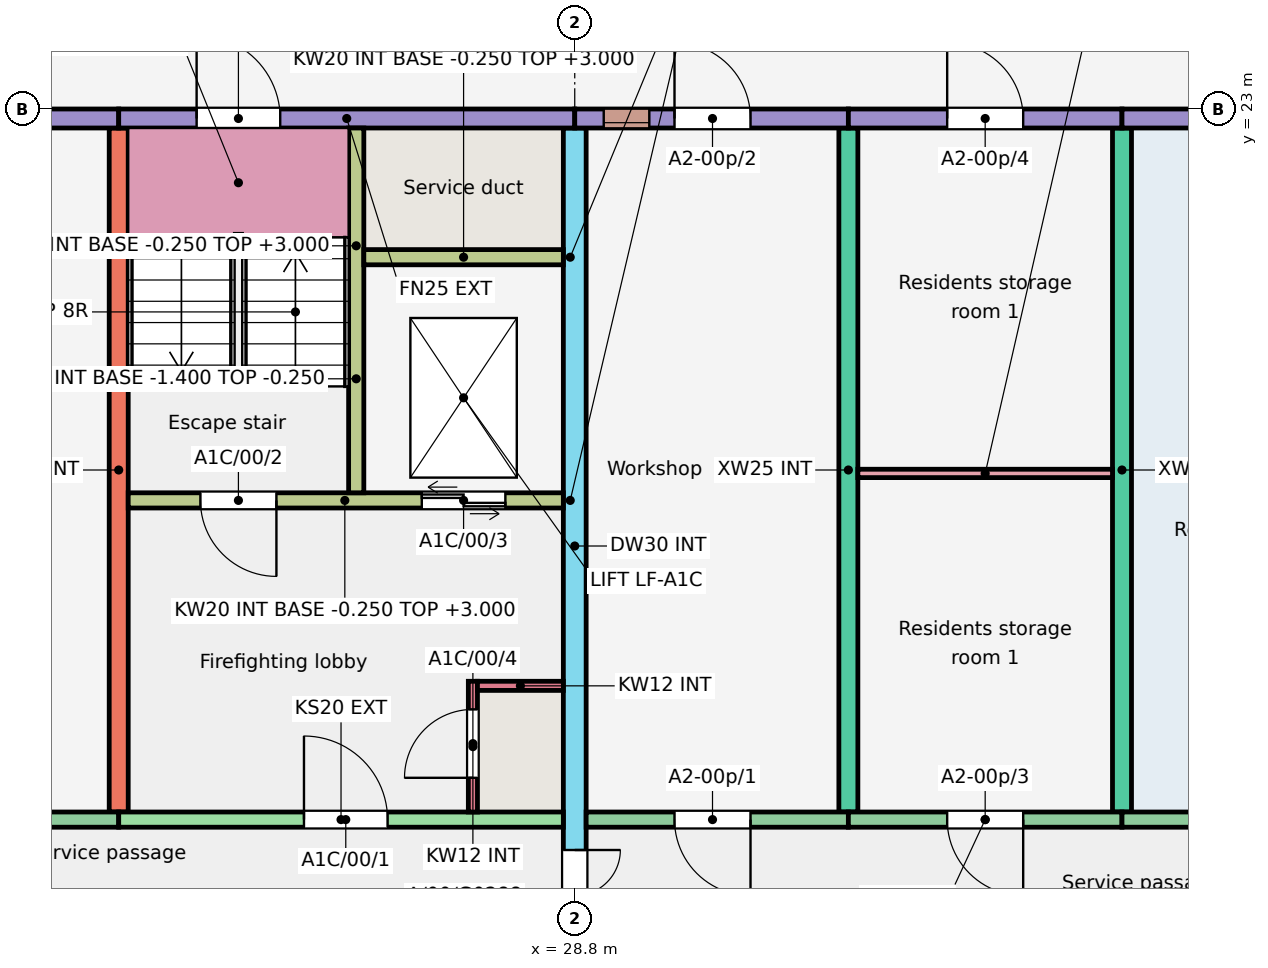
"""IFC4 building model, lengths in metres.
Left out: names, types, materials, properties, quantities, classifications, styles, units other than length and angle.
Written with IfcOpenShell. Run it as: python <this file> out.ifc"""

import sys

from ifc_helpers import new_model, si_unit, direction, frame, frame_2d, origin, place, context, subcontext, project, spatial, rectangle, extrude, element, fill, save


model = new_model("IFC4")
c1 = context("Model", 3, precision=1e-05, world=origin(), true_north=direction((0.0, 1.0)))
c2 = subcontext(c1, "Body", "Model", "MODEL_VIEW")
j1 = project(units=[si_unit("LENGTHUNIT", "METRE"), si_unit("PLANEANGLEUNIT", "RADIAN")], contexts=[c1])
p1 = place(None, origin())
s1 = spatial("IfcSite", under=j1, at=p1, CompositionType="ELEMENT")
p2 = place(p1, origin())
s2 = spatial("IfcBuilding", under=s1, at=p2, CompositionType="ELEMENT")
p3 = place(p2, origin())
s3 = spatial("IfcBuildingStorey", under=s2, at=p3, CompositionType="ELEMENT", Elevation=0.0)
p4 = place(p3, frame((22.8, 13.75, -0.25), z_axis=(0.0, 0.0, 1.0), x_axis=(0.0, 1.0, 0.0)))
e1 = element("IfcWall", 1, at=p4, inside=s3, PredefinedType="SHEAR", context=c2, shape_type="SweptSolid", body=[
    extrude(rectangle(XDim=9.0, YDim=0.25, at=frame_2d((4.5, 0.0))), origin(), (0.0, 0.0, 1.0), 3.25),
])
p5 = place(p3, frame((28.8, 11.75, -0.25), z_axis=(0.0, 0.0, 1.0), x_axis=(0.0, 1.0, 0.0)))
e2 = element("IfcWall", 2, at=p5, inside=s3, PredefinedType="SHEAR", context=c2, shape_type="SweptSolid", body=[
    extrude(rectangle(XDim=11.0, YDim=0.3, at=frame_2d((5.5, 0.0))), origin(), (0.0, 0.0, 1.0), 3.25),
])
p6 = place(p5, frame((0.3, 0.0, 0.25)))
e3 = element("IfcOpeningElement", 3, at=p6, cuts=e2, PredefinedType="OPENING", context=c2, shape_type="SweptSolid", body=[
    extrude(rectangle(XDim=1.2, YDim=2.1, at=frame_2d((0.6, 1.05))), frame((0.0, 0.16, 0.0), z_axis=(0.0, -1.0, 0.0), x_axis=(1.0, 0.0, 0.0)), (0.0, 0.0, 1.0), 0.32),
])
for number, where, z_axis, x_axis in (
    (4, (32.4, 13.75, -0.25), (0.0, 0.0, 1.0), (0.0, 1.0, 0.0)),
    (5, (36.0, 13.75, -0.25), (0.0, 0.0, 1.0), (0.0, 1.0, 0.0)),
):
    element("IfcWall", number, at=place(p3, frame(where, z_axis=z_axis, x_axis=x_axis)), inside=s3, PredefinedType="SHEAR", context=c2, shape_type="SweptSolid", body=[
        extrude(rectangle(XDim=9.0, YDim=0.25, at=frame_2d((4.5, 0.0))), origin(), (0.0, 0.0, 1.0), 3.25),
    ])
p7 = place(p3, frame((19.2, 22.875, -0.25), z_axis=(0.0, 0.0, 1.0), x_axis=(1.0, 0.0, 0.0)))
e6 = element("IfcWall", 6, at=p7, inside=s3, PredefinedType="SOLIDWALL", context=c2, shape_type="SweptSolid", body=[
    extrude(rectangle(XDim=3.6, YDim=0.25, at=frame_2d((1.8, 0.0))), origin(), (0.0, 0.0, 1.0), 3.25),
])
p8 = place(p7, frame((0.363, 0.0, 2.05)))
e7 = element("IfcOpeningElement", 7, at=p8, cuts=e6, PredefinedType="OPENING", context=c2, shape_type="SweptSolid", body=[
    extrude(rectangle(XDim=0.6, YDim=0.6, at=frame_2d((0.3, 0.3))), frame((0.0, 0.135, 0.0), z_axis=(0.0, -1.0, 0.0), x_axis=(1.0, 0.0, 0.0)), (0.0, 0.0, 1.0), 0.27),
])
p9 = place(p7, frame((1.3, 0.0, 0.25)))
e8 = element("IfcOpeningElement", 8, at=p9, cuts=e6, PredefinedType="OPENING", context=c2, shape_type="SweptSolid", body=[
    extrude(rectangle(XDim=1.0, YDim=2.1, at=frame_2d((0.5, 1.05))), frame((0.0, 0.135, 0.0), z_axis=(0.0, -1.0, 0.0), x_axis=(1.0, 0.0, 0.0)), (0.0, 0.0, 1.0), 0.27),
])
p10 = place(p3, frame((19.2, 13.65, -0.25), z_axis=(0.0, 0.0, 1.0), x_axis=(1.0, 0.0, 0.0)))
e9 = element("IfcWall", 9, at=p10, inside=s3, PredefinedType="SOLIDWALL", context=c2, shape_type="SweptSolid", body=[
    extrude(rectangle(XDim=3.6, YDim=0.2, at=frame_2d((1.8, 0.0))), origin(), (0.0, 0.0, 1.0), 3.25),
])
p11 = place(p10, frame((1.3, 0.0, 0.25)))
e10 = element("IfcOpeningElement", 10, at=p11, cuts=e9, PredefinedType="OPENING", context=c2, shape_type="SweptSolid", body=[
    extrude(rectangle(XDim=1.0, YDim=2.1, at=frame_2d((0.5, 1.05))), frame((0.0, 0.11, 0.0), z_axis=(0.0, -1.0, 0.0), x_axis=(1.0, 0.0, 0.0)), (0.0, 0.0, 1.0), 0.22),
])
p12 = place(p3, frame((22.8, 22.875, -0.25), z_axis=(0.0, 0.0, 1.0), x_axis=(1.0, 0.0, 0.0)))
e11 = element("IfcWall", 11, at=p12, inside=s3, PredefinedType="SOLIDWALL", context=c2, shape_type="SweptSolid", body=[
    extrude(rectangle(XDim=6.0, YDim=0.25, at=frame_2d((3.0, 0.0))), origin(), (0.0, 0.0, 1.0), 3.25),
])
p13 = place(p12, frame((1.025, 0.0, 0.25)))
e12 = element("IfcOpeningElement", 12, at=p13, cuts=e11, PredefinedType="OPENING", context=c2, shape_type="SweptSolid", body=[
    extrude(rectangle(XDim=1.1, YDim=2.1, at=frame_2d((0.55, 1.05))), frame((0.0, 0.135, 0.0), z_axis=(0.0, -1.0, 0.0), x_axis=(1.0, 0.0, 0.0)), (0.0, 0.0, 1.0), 0.27),
])
p14 = place(p3, frame((22.8, 13.65, -0.25), z_axis=(0.0, 0.0, 1.0), x_axis=(1.0, 0.0, 0.0)))
e13 = element("IfcWall", 13, at=p14, inside=s3, PredefinedType="SHEAR", context=c2, shape_type="SweptSolid", body=[
    extrude(rectangle(XDim=5.85, YDim=0.2, at=frame_2d((2.925, 0.0))), origin(), (0.0, 0.0, 1.0), 3.25),
])
p15 = place(p14, frame((2.438, 0.0, 0.25)))
e14 = element("IfcOpeningElement", 14, at=p15, cuts=e13, PredefinedType="OPENING", context=c2, shape_type="SweptSolid", body=[
    extrude(rectangle(XDim=1.1, YDim=2.1, at=frame_2d((0.55, 1.05))), frame((0.0, 0.11, 0.0), z_axis=(0.0, -1.0, 0.0), x_axis=(1.0, 0.0, 0.0)), (0.0, 0.0, 1.0), 0.22),
])
p16 = place(p3, frame((22.925, 17.85, -0.25), z_axis=(0.0, 0.0, 1.0), x_axis=(1.0, 0.0, 0.0)))
e15 = element("IfcWall", 15, at=p16, inside=s3, PredefinedType="SHEAR", context=c2, shape_type="SweptSolid", body=[
    extrude(rectangle(XDim=5.725, YDim=0.2, at=frame_2d((2.862, 0.0))), origin(), (0.0, 0.0, 1.0), 3.25),
])
p17 = place(p16, frame((0.95, 0.0, 0.25)))
e16 = element("IfcOpeningElement", 16, at=p17, cuts=e15, PredefinedType="OPENING", context=c2, shape_type="SweptSolid", body=[
    extrude(rectangle(XDim=1.0, YDim=2.1, at=frame_2d((0.5, 1.05))), frame((0.0, 0.11, 0.0), z_axis=(0.0, -1.0, 0.0), x_axis=(1.0, 0.0, 0.0)), (0.0, 0.0, 1.0), 0.22),
])
p18 = place(p16, frame((3.863, 0.0, 0.25)))
e17 = element("IfcOpeningElement", 17, at=p18, cuts=e15, PredefinedType="OPENING", context=c2, shape_type="SweptSolid", body=[
    extrude(rectangle(XDim=1.1, YDim=2.1, at=frame_2d((0.55, 1.05))), frame((0.0, 0.11, 0.0), z_axis=(0.0, -1.0, 0.0), x_axis=(1.0, 0.0, 0.0)), (0.0, 0.0, 1.0), 0.22),
])
p19 = place(p3, frame((25.925, 17.95, -0.25), z_axis=(0.0, 0.0, 1.0), x_axis=(0.0, 1.0, 0.0)))
e18 = element("IfcWall", 18, at=p19, inside=s3, PredefinedType="SHEAR", context=c2, shape_type="SweptSolid", body=[
    extrude(rectangle(XDim=4.8, YDim=0.2, at=frame_2d((2.4, 0.0))), origin(), (0.0, 0.0, 1.0), 3.25),
])
p20 = place(p3, frame((26.025, 21.05, -0.25), z_axis=(0.0, 0.0, 1.0), x_axis=(1.0, 0.0, 0.0)))
e19 = element("IfcWall", 19, at=p20, inside=s3, PredefinedType="SHEAR", context=c2, shape_type="SweptSolid", body=[
    extrude(rectangle(XDim=2.625, YDim=0.2, at=frame_2d((1.312, 0.0))), origin(), (0.0, 0.0, 1.0), 3.25),
])
p21 = place(p3, frame((27.46, 13.75, -0.25), z_axis=(0.0, 0.0, 1.0), x_axis=(0.0, 1.0, 0.0)))
e20 = element("IfcWall", 20, at=p21, inside=s3, PredefinedType="SHEAR", context=c2, shape_type="SweptSolid", body=[
    extrude(rectangle(XDim=1.72, YDim=0.12, at=frame_2d((0.86, 0.0))), origin(), (0.0, 0.0, 1.0), 3.25),
])
p22 = place(p21, frame((0.45, 0.0, 0.25)))
e21 = element("IfcOpeningElement", 21, at=p22, cuts=e20, PredefinedType="OPENING", context=c2, shape_type="SweptSolid", body=[
    extrude(rectangle(XDim=0.9, YDim=2.1, at=frame_2d((0.45, 1.05))), frame((0.0, 0.07, 0.0), z_axis=(0.0, -1.0, 0.0), x_axis=(1.0, 0.0, 0.0)), (0.0, 0.0, 1.0), 0.14),
])
p23 = place(p3, frame((27.52, 15.41, -0.25), z_axis=(0.0, 0.0, 1.0), x_axis=(1.0, 0.0, 0.0)))
e22 = element("IfcWall", 22, at=p23, inside=s3, PredefinedType="SHEAR", context=c2, shape_type="SweptSolid", body=[
    extrude(rectangle(XDim=1.13, YDim=0.12, at=frame_2d((0.565, 0.0))), origin(), (0.0, 0.0, 1.0), 3.25),
])
p24 = place(p3, frame((28.8, 22.875, -0.25), z_axis=(0.0, 0.0, 1.0), x_axis=(1.0, 0.0, 0.0)))
e23 = element("IfcWall", 23, at=p24, inside=s3, PredefinedType="SOLIDWALL", context=c2, shape_type="SweptSolid", body=[
    extrude(rectangle(XDim=3.6, YDim=0.25, at=frame_2d((1.8, 0.0))), origin(), (0.0, 0.0, 1.0), 3.25),
])
p25 = place(p24, frame((0.381, 0.0, 2.05)))
e24 = element("IfcOpeningElement", 24, at=p25, cuts=e23, PredefinedType="OPENING", context=c2, shape_type="SweptSolid", body=[
    extrude(rectangle(XDim=0.6, YDim=0.6, at=frame_2d((0.3, 0.3))), frame((0.0, 0.135, 0.0), z_axis=(0.0, -1.0, 0.0), x_axis=(1.0, 0.0, 0.0)), (0.0, 0.0, 1.0), 0.27),
])
p26 = place(p24, frame((1.312, 0.0, 0.25)))
e25 = element("IfcOpeningElement", 25, at=p26, cuts=e23, PredefinedType="OPENING", context=c2, shape_type="SweptSolid", body=[
    extrude(rectangle(XDim=1.0, YDim=2.1, at=frame_2d((0.5, 1.05))), frame((0.0, 0.135, 0.0), z_axis=(0.0, -1.0, 0.0), x_axis=(1.0, 0.0, 0.0)), (0.0, 0.0, 1.0), 0.27),
])
p27 = place(p3, frame((28.95, 13.65, -0.25), z_axis=(0.0, 0.0, 1.0), x_axis=(1.0, 0.0, 0.0)))
e26 = element("IfcWall", 26, at=p27, inside=s3, PredefinedType="SOLIDWALL", context=c2, shape_type="SweptSolid", body=[
    extrude(rectangle(XDim=3.45, YDim=0.2, at=frame_2d((1.725, 0.0))), origin(), (0.0, 0.0, 1.0), 3.25),
])
p28 = place(p27, frame((1.163, 0.0, 0.25)))
e27 = element("IfcOpeningElement", 27, at=p28, cuts=e26, PredefinedType="OPENING", context=c2, shape_type="SweptSolid", body=[
    extrude(rectangle(XDim=1.0, YDim=2.1, at=frame_2d((0.5, 1.05))), frame((0.0, 0.11, 0.0), z_axis=(0.0, -1.0, 0.0), x_axis=(1.0, 0.0, 0.0)), (0.0, 0.0, 1.0), 0.22),
])
p29 = place(p3, frame((32.4, 22.875, -0.25), z_axis=(0.0, 0.0, 1.0), x_axis=(1.0, 0.0, 0.0)))
e28 = element("IfcWall", 28, at=p29, inside=s3, PredefinedType="SOLIDWALL", context=c2, shape_type="SweptSolid", body=[
    extrude(rectangle(XDim=3.6, YDim=0.25, at=frame_2d((1.8, 0.0))), origin(), (0.0, 0.0, 1.0), 3.25),
])
p30 = place(p29, frame((1.3, 0.0, 0.25)))
e29 = element("IfcOpeningElement", 29, at=p30, cuts=e28, PredefinedType="OPENING", context=c2, shape_type="SweptSolid", body=[
    extrude(rectangle(XDim=1.0, YDim=2.1, at=frame_2d((0.5, 1.05))), frame((0.0, 0.135, 0.0), z_axis=(0.0, -1.0, 0.0), x_axis=(1.0, 0.0, 0.0)), (0.0, 0.0, 1.0), 0.27),
])
p31 = place(p3, frame((32.4, 13.65, -0.25), z_axis=(0.0, 0.0, 1.0), x_axis=(1.0, 0.0, 0.0)))
e30 = element("IfcWall", 30, at=p31, inside=s3, PredefinedType="SOLIDWALL", context=c2, shape_type="SweptSolid", body=[
    extrude(rectangle(XDim=3.6, YDim=0.2, at=frame_2d((1.8, 0.0))), origin(), (0.0, 0.0, 1.0), 3.25),
])
p32 = place(p31, frame((1.3, 0.0, 0.25)))
e31 = element("IfcOpeningElement", 31, at=p32, cuts=e30, PredefinedType="OPENING", context=c2, shape_type="SweptSolid", body=[
    extrude(rectangle(XDim=1.0, YDim=2.1, at=frame_2d((0.5, 1.05))), frame((0.0, 0.11, 0.0), z_axis=(0.0, -1.0, 0.0), x_axis=(1.0, 0.0, 0.0)), (0.0, 0.0, 1.0), 0.22),
])
p33 = place(p3, frame((36.0, 22.875, -0.25), z_axis=(0.0, 0.0, 1.0), x_axis=(1.0, 0.0, 0.0)))
e32 = element("IfcWall", 32, at=p33, inside=s3, PredefinedType="SOLIDWALL", context=c2, shape_type="SweptSolid", body=[
    extrude(rectangle(XDim=3.6, YDim=0.25, at=frame_2d((1.8, 0.0))), origin(), (0.0, 0.0, 1.0), 3.25),
])
p34 = place(p33, frame((2.637, 0.0, 2.05)))
e33 = element("IfcOpeningElement", 33, at=p34, cuts=e32, PredefinedType="OPENING", context=c2, shape_type="SweptSolid", body=[
    extrude(rectangle(XDim=0.6, YDim=0.6, at=frame_2d((0.3, 0.3))), frame((0.0, 0.135, 0.0), z_axis=(0.0, -1.0, 0.0), x_axis=(1.0, 0.0, 0.0)), (0.0, 0.0, 1.0), 0.27),
])
p35 = place(p33, frame((1.3, 0.0, 0.25)))
e34 = element("IfcOpeningElement", 34, at=p35, cuts=e32, PredefinedType="OPENING", context=c2, shape_type="SweptSolid", body=[
    extrude(rectangle(XDim=1.0, YDim=2.1, at=frame_2d((0.5, 1.05))), frame((0.0, 0.135, 0.0), z_axis=(0.0, -1.0, 0.0), x_axis=(1.0, 0.0, 0.0)), (0.0, 0.0, 1.0), 0.27),
])
p36 = place(p3, frame((36.0, 13.65, -0.25), z_axis=(0.0, 0.0, 1.0), x_axis=(1.0, 0.0, 0.0)))
e35 = element("IfcWall", 35, at=p36, inside=s3, PredefinedType="SOLIDWALL", context=c2, shape_type="SweptSolid", body=[
    extrude(rectangle(XDim=3.6, YDim=0.2, at=frame_2d((1.8, 0.0))), origin(), (0.0, 0.0, 1.0), 3.25),
])
p37 = place(p36, frame((1.3, 0.0, 0.25)))
e36 = element("IfcOpeningElement", 36, at=p37, cuts=e35, PredefinedType="OPENING", context=c2, shape_type="SweptSolid", body=[
    extrude(rectangle(XDim=1.0, YDim=2.1, at=frame_2d((0.5, 1.05))), frame((0.0, 0.11, 0.0), z_axis=(0.0, -1.0, 0.0), x_axis=(1.0, 0.0, 0.0)), (0.0, 0.0, 1.0), 0.22),
])
for number, where, z_axis, x_axis in (
    (37, (25.825, 17.85, -1.4), (0.0, 0.0, 1.0), (1.0, 0.0, 0.0)),
    (38, (25.825, 21.05, -1.4), (0.0, 0.0, 1.0), (1.0, 0.0, 0.0)),
):
    element("IfcWall", number, at=place(p3, frame(where, z_axis=z_axis, x_axis=x_axis)), inside=s3, PredefinedType="SHEAR", context=c2, shape_type="SweptSolid", body=[
        extrude(rectangle(XDim=2.975, YDim=0.2, at=frame_2d((1.488, 0.0))), origin(), (0.0, 0.0, 1.0), 1.15),
    ])
p38 = place(p3, frame((25.925, 17.95, -1.4), z_axis=(0.0, 0.0, 1.0), x_axis=(0.0, 1.0, 0.0)))
e39 = element("IfcWall", 39, at=p38, inside=s3, PredefinedType="SHEAR", context=c2, shape_type="SweptSolid", body=[
    extrude(rectangle(XDim=3.0, YDim=0.2, at=frame_2d((1.5, 0.0))), origin(), (0.0, 0.0, 1.0), 1.15),
])
p39 = place(p3, frame((28.725, 17.95, -1.4), z_axis=(0.0, 0.0, 1.0), x_axis=(0.0, 1.0, 0.0)))
e40 = element("IfcWall", 40, at=p39, inside=s3, PredefinedType="SHEAR", context=c2, shape_type="SweptSolid", body=[
    extrude(rectangle(XDim=3.0, YDim=0.15, at=frame_2d((1.5, 0.0))), origin(), (0.0, 0.0, 1.0), 1.15),
])
p40 = place(p3, frame((32.525, 18.205, 0.0), z_axis=(0.0, 0.0, 1.0), x_axis=(1.0, 0.0, 0.0)))
e41 = element("IfcWall", 41, at=p40, inside=s3, PredefinedType="PARTITIONING", context=c2, shape_type="SweptSolid", body=[
    extrude(rectangle(XDim=3.35, YDim=0.11, at=frame_2d((1.675, 0.0))), origin(), (0.0, 0.0, 1.0), 2.8),
])
p41 = place(p25, origin())
e42 = element("IfcWindow", 42, at=p41, inside=s3, PartitioningType="SINGLE_PANEL", PredefinedType="WINDOW", context=c2, shape_type="SweptSolid", body=[
    extrude(rectangle(XDim=0.6, YDim=0.6, at=frame_2d((0.3, 0.3))), frame((0.0, -0.025, 0.0), z_axis=(0.0, -1.0, 0.0), x_axis=(1.0, 0.0, 0.0)), (0.0, 0.0, 1.0), 0.06),
])
fill(e24, e42)
p42 = place(p28, origin())
e43 = element("IfcDoor", 43, at=p42, inside=s3, OperationType="SINGLE_SWING_RIGHT", PredefinedType="DOOR", context=c2, shape_type="SweptSolid", body=[
    extrude(rectangle(XDim=1.0, YDim=2.1, at=frame_2d((0.5, 1.05))), frame((0.0, 0.025, 0.0), z_axis=(0.0, -1.0, 0.0), x_axis=(1.0, 0.0, 0.0)), (0.0, 0.0, 1.0), 0.05),
])
fill(e27, e43)
p43 = place(p26, origin())
e44 = element("IfcDoor", 44, at=p43, inside=s3, OperationType="SINGLE_SWING_LEFT", PredefinedType="DOOR", context=c2, shape_type="SweptSolid", body=[
    extrude(rectangle(XDim=1.0, YDim=2.1, at=frame_2d((0.5, 1.05))), frame((0.0, 0.025, 0.0), z_axis=(0.0, -1.0, 0.0), x_axis=(1.0, 0.0, 0.0)), (0.0, 0.0, 1.0), 0.05),
])
fill(e25, e44)
p44 = place(p32, origin())
e45 = element("IfcDoor", 45, at=p44, inside=s3, OperationType="SINGLE_SWING_RIGHT", PredefinedType="DOOR", context=c2, shape_type="SweptSolid", body=[
    extrude(rectangle(XDim=1.0, YDim=2.1, at=frame_2d((0.5, 1.05))), frame((0.0, 0.025, 0.0), z_axis=(0.0, -1.0, 0.0), x_axis=(1.0, 0.0, 0.0)), (0.0, 0.0, 1.0), 0.05),
])
fill(e31, e45)
p45 = place(p30, origin())
e46 = element("IfcDoor", 46, at=p45, inside=s3, OperationType="SINGLE_SWING_LEFT", PredefinedType="DOOR", context=c2, shape_type="SweptSolid", body=[
    extrude(rectangle(XDim=1.0, YDim=2.1, at=frame_2d((0.5, 1.05))), frame((0.0, 0.025, 0.0), z_axis=(0.0, -1.0, 0.0), x_axis=(1.0, 0.0, 0.0)), (0.0, 0.0, 1.0), 0.05),
])
fill(e29, e46)
p46 = place(p15, origin())
e47 = element("IfcDoor", 47, at=p46, inside=s3, OperationType="SINGLE_SWING_LEFT", PredefinedType="DOOR", context=c2, shape_type="SweptSolid", body=[
    extrude(rectangle(XDim=1.1, YDim=2.1, at=frame_2d((0.55, 1.05))), frame((0.0, 0.025, 0.0), z_axis=(0.0, -1.0, 0.0), x_axis=(1.0, 0.0, 0.0)), (0.0, 0.0, 1.0), 0.05),
])
fill(e14, e47)
p47 = place(p17, origin())
e48 = element("IfcDoor", 48, at=p47, inside=s3, OperationType="SINGLE_SWING_RIGHT", PredefinedType="DOOR", context=c2, shape_type="SweptSolid", body=[
    extrude(rectangle(XDim=1.0, YDim=2.1, at=frame_2d((0.5, 1.05))), frame((0.0, 0.025, 0.0), z_axis=(0.0, -1.0, 0.0), x_axis=(1.0, 0.0, 0.0)), (0.0, 0.0, 1.0), 0.05),
])
fill(e16, e48)
p48 = place(p18, origin())
e49 = element("IfcDoor", 49, at=p48, inside=s3, OperationType="DOUBLE_DOOR_SLIDING", PredefinedType="DOOR", context=c2, shape_type="SweptSolid", body=[
    extrude(rectangle(XDim=1.1, YDim=2.1, at=frame_2d((0.55, 1.05))), frame((0.0, 0.025, 0.0), z_axis=(0.0, -1.0, 0.0), x_axis=(1.0, 0.0, 0.0)), (0.0, 0.0, 1.0), 0.05),
])
fill(e17, e49)
p49 = place(p22, origin())
e50 = element("IfcDoor", 50, at=p49, inside=s3, OperationType="SINGLE_SWING_LEFT", PredefinedType="DOOR", context=c2, shape_type="SweptSolid", body=[
    extrude(rectangle(XDim=0.9, YDim=2.1, at=frame_2d((0.45, 1.05))), frame((0.0, 0.025, 0.0), z_axis=(0.0, -1.0, 0.0), x_axis=(1.0, 0.0, 0.0)), (0.0, 0.0, 1.0), 0.05),
])
fill(e21, e50)
p50 = place(p13, origin())
e51 = element("IfcDoor", 51, at=p50, inside=s3, OperationType="SINGLE_SWING_LEFT", PredefinedType="DOOR", context=c2, shape_type="SweptSolid", body=[
    extrude(rectangle(XDim=1.1, YDim=2.1, at=frame_2d((0.55, 1.05))), frame((0.0, 0.025, 0.0), z_axis=(0.0, -1.0, 0.0), x_axis=(1.0, 0.0, 0.0)), (0.0, 0.0, 1.0), 0.05),
])
fill(e12, e51)
p51 = place(p6, origin())
e52 = element("IfcDoor", 52, at=p51, inside=s3, OperationType="DOUBLE_DOOR_SINGLE_SWING", PredefinedType="DOOR", context=c2, shape_type="SweptSolid", body=[
    extrude(rectangle(XDim=1.2, YDim=2.1, at=frame_2d((0.6, 1.05))), frame((0.0, 0.025, 0.0), z_axis=(0.0, -1.0, 0.0), x_axis=(1.0, 0.0, 0.0)), (0.0, 0.0, 1.0), 0.05),
])
fill(e3, e52)
save(model, sys.argv[1])
